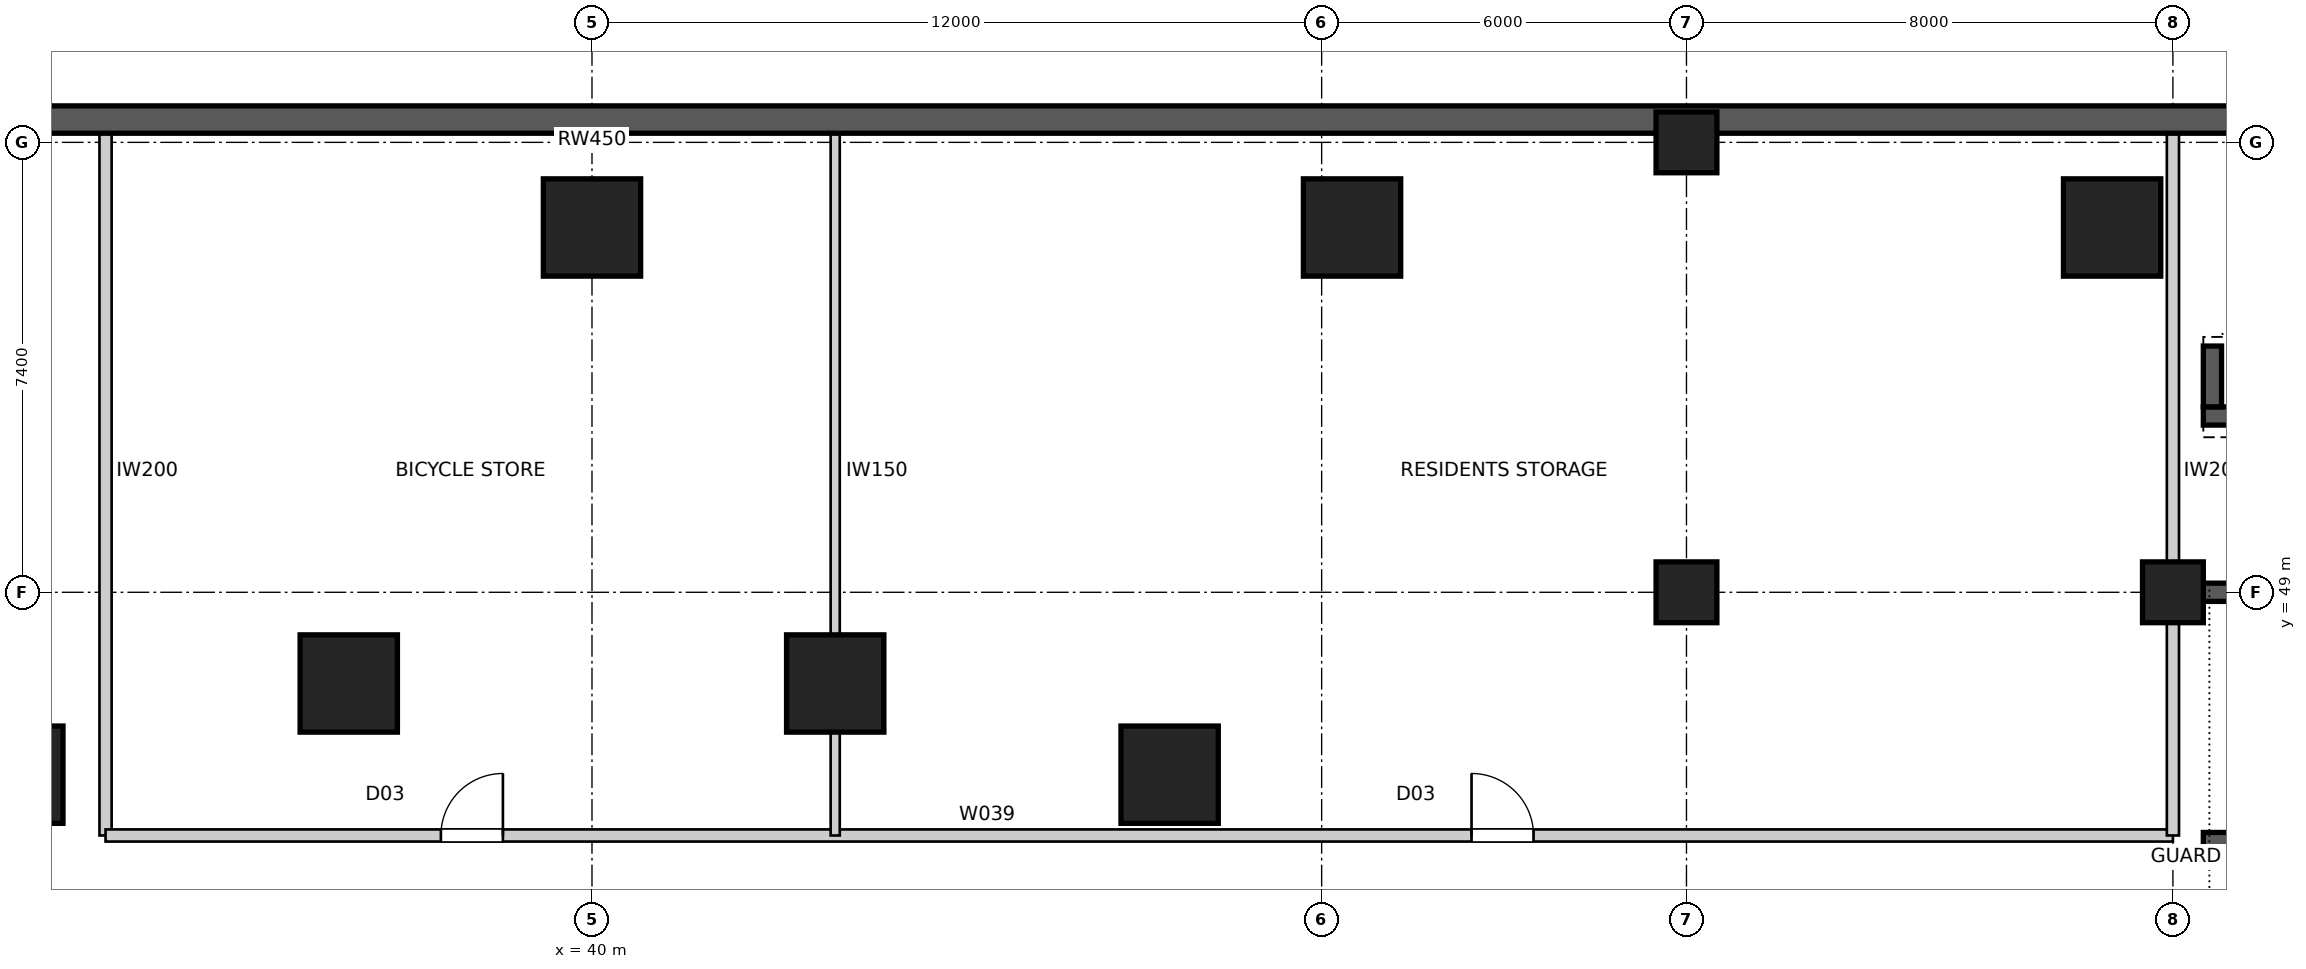
"""IFC4 building model, lengths in metres.
Left out: names, types, materials, properties, quantities, classifications, styles, units other than length and angle.
Written with IfcOpenShell. Run it as: python <this file> out.ifc"""

import sys

from ifc_helpers import new_model, si_unit, direction, frame, frame_2d, origin, origin_2d, place, context, subcontext, project, spatial, rectangle, extrude, element, fill, save


model = new_model("IFC4")
c1 = context("Model", 3, precision=1e-05, world=origin(), true_north=direction((0.0, 1.0)))
c2 = subcontext(c1, "Body", "Model", "MODEL_VIEW")
j1 = project(units=[si_unit("LENGTHUNIT", "METRE"), si_unit("PLANEANGLEUNIT", "RADIAN")], contexts=[c1])
p1 = place(None, origin())
s1 = spatial("IfcSite", under=j1, at=p1, CompositionType="ELEMENT")
p2 = place(p1, origin())
s2 = spatial("IfcBuilding", under=s1, at=p2, CompositionType="ELEMENT")
p3 = place(p2, frame((0.0, 0.0, -3.7)))
s3 = spatial("IfcBuildingStorey", under=s2, at=p3, CompositionType="ELEMENT", Elevation=-3.7)
for number, where, z_axis, x_axis in (
    (1, (65.0, 55.0, 0.0), (0.0, 0.0, 1.0), (1.0, 0.0, 0.0)),
    (2, (52.5, 55.0, 0.0), (0.0, 0.0, 1.0), (1.0, 0.0, 0.0)),
    (3, (40.0, 55.0, 0.0), (0.0, 0.0, 1.0), (1.0, 0.0, 0.0)),
):
    element("IfcColumn", number, at=place(p3, frame(where, z_axis=z_axis, x_axis=x_axis)), inside=s3, PredefinedType="COLUMN", context=c2, shape_type="SweptSolid", body=[
        extrude(rectangle(XDim=1.6, YDim=1.6, at=origin_2d()), origin(), (0.0, 0.0, 1.0), 3.7),
    ])
for number, where, z_axis, x_axis in (
    (4, (58.0, 49.0, 0.0), (0.0, 0.0, 1.0), (1.0, 0.0, 0.0)),
    (5, (58.0, 56.4, 0.0), (0.0, 0.0, 1.0), (1.0, 0.0, 0.0)),
    (6, (66.0, 49.0, 0.0), (0.0, 0.0, 1.0), (1.0, 0.0, 0.0)),
):
    element("IfcColumn", number, at=place(p3, frame(where, z_axis=z_axis, x_axis=x_axis)), inside=s3, PredefinedType="COLUMN", context=c2, shape_type="SweptSolid", body=[
        extrude(rectangle(XDim=1.0, YDim=1.0, at=origin_2d()), origin(), (0.0, 0.0, 1.0), 3.7),
    ])
for number, where, z_axis, x_axis in (
    (7, (49.5, 46.0, 0.0), (0.0, 0.0, 1.0), (1.0, 0.0, 0.0)),
    (8, (44.0, 47.5, 0.0), (0.0, 0.0, 1.0), (1.0, 0.0, 0.0)),
    (9, (36.0, 47.5, 0.0), (0.0, 0.0, 1.0), (1.0, 0.0, 0.0)),
    (10, (30.5, 46.0, 0.0), (0.0, 0.0, 1.0), (1.0, 0.0, 0.0)),
):
    element("IfcColumn", number, at=place(p3, frame(where, z_axis=z_axis, x_axis=x_axis)), inside=s3, PredefinedType="COLUMN", context=c2, shape_type="SweptSolid", body=[
        extrude(rectangle(XDim=1.6, YDim=1.6, at=origin_2d()), origin(), (0.0, 0.0, 1.0), 3.7),
    ])
p4 = place(p3, frame((78.0, 56.775, 0.0), z_axis=(0.0, 0.0, 1.0), x_axis=(-1.0, 0.0, 0.0)))
e11 = element("IfcWall", 11, at=p4, inside=s3, PredefinedType="SHEAR", context=c2, shape_type="SweptSolid", body=[
    extrude(rectangle(XDim=76.0, YDim=0.45, at=frame_2d((38.0, 0.0))), origin(), (0.0, 0.0, 1.0), 3.7),
])
p5 = place(p3, frame((32.0, 57.0, 0.0), z_axis=(0.0, 0.0, 1.0), x_axis=(0.0, -1.0, 0.0)))
e12 = element("IfcWall", 12, at=p5, inside=s3, PredefinedType="PARTITIONING", context=c2, shape_type="SweptSolid", body=[
    extrude(rectangle(XDim=12.0, YDim=0.2, at=frame_2d((6.0, 0.0))), origin(), (0.0, 0.0, 1.0), 3.35),
])
p6 = place(p3, frame((32.0, 45.0, 0.0), z_axis=(0.0, 0.0, 1.0), x_axis=(1.0, 0.0, 0.0)))
e13 = element("IfcWall", 13, at=p6, inside=s3, PredefinedType="PARTITIONING", context=c2, shape_type="SweptSolid", body=[
    extrude(rectangle(XDim=34.0, YDim=0.2, at=frame_2d((17.0, 0.0))), origin(), (0.0, 0.0, 1.0), 3.35),
])
p7 = place(p6, frame((22.465, 0.0, 0.0)))
e14 = element("IfcOpeningElement", 14, at=p7, cuts=e13, PredefinedType="OPENING", context=c2, shape_type="SweptSolid", body=[
    extrude(rectangle(XDim=1.02, YDim=2.1, at=frame_2d((0.51, 1.05))), frame((0.0, 0.11, 0.0), z_axis=(0.0, -1.0, 0.0), x_axis=(1.0, 0.0, 0.0)), (0.0, 0.0, 1.0), 0.22),
])
p8 = place(p6, frame((5.515, 0.0, 0.0)))
e15 = element("IfcOpeningElement", 15, at=p8, cuts=e13, PredefinedType="OPENING", context=c2, shape_type="SweptSolid", body=[
    extrude(rectangle(XDim=1.02, YDim=2.1, at=frame_2d((0.51, 1.05))), frame((0.0, 0.11, 0.0), z_axis=(0.0, -1.0, 0.0), x_axis=(1.0, 0.0, 0.0)), (0.0, 0.0, 1.0), 0.22),
])
p9 = place(p3, frame((44.0, 57.0, 0.0), z_axis=(0.0, 0.0, 1.0), x_axis=(0.0, -1.0, 0.0)))
e16 = element("IfcWall", 16, at=p9, inside=s3, PredefinedType="SOLIDWALL", context=c2, shape_type="SweptSolid", body=[
    extrude(rectangle(XDim=12.0, YDim=0.15, at=frame_2d((6.0, 0.0))), origin(), (0.0, 0.0, 1.0), 3.35),
])
p10 = place(p3, frame((66.0, 57.0, 0.0), z_axis=(0.0, 0.0, 1.0), x_axis=(0.0, -1.0, 0.0)))
e17 = element("IfcWall", 17, at=p10, inside=s3, PredefinedType="PARTITIONING", context=c2, shape_type="SweptSolid", body=[
    extrude(rectangle(XDim=12.0, YDim=0.2, at=frame_2d((6.0, 0.0))), origin(), (0.0, 0.0, 1.0), 3.35),
])
p11 = place(p3, frame((66.5, 44.9, 0.0), z_axis=(0.0, 0.0, 1.0), x_axis=(1.0, 0.0, 0.0)))
e18 = element("IfcWall", 18, at=p11, inside=s3, PredefinedType="SHEAR", context=c2, shape_type="SweptSolid", body=[
    extrude(rectangle(XDim=5.1, YDim=0.3, at=frame_2d((2.55, 0.0))), origin(), (0.0, 0.0, 1.0), 1.59),
])
p12 = place(p3, frame((66.5, 49.0, 0.0), z_axis=(0.0, 0.0, 1.0), x_axis=(1.0, 0.0, 0.0)))
e19 = element("IfcWall", 19, at=p12, inside=s3, PredefinedType="SHEAR", context=c2, shape_type="SweptSolid", body=[
    extrude(rectangle(XDim=5.1, YDim=0.3, at=frame_2d((2.55, 0.0))), origin(), (0.0, 0.0, 1.0), 2.615),
])
p13 = place(p3, frame((66.5, 51.9, -3.7), z_axis=(0.0, 0.0, 1.0), x_axis=(1.0, 0.0, 0.0)))
e20 = element("IfcWall", 20, at=p13, inside=s3, PredefinedType="SHEAR", context=c2, shape_type="SweptSolid", body=[
    extrude(rectangle(XDim=5.1, YDim=0.3, at=frame_2d((2.55, 0.0))), origin(), (0.0, 0.0, 1.0), 6.977),
])
p14 = place(p3, frame((66.65, 52.05, -3.7), z_axis=(0.0, 0.0, 1.0), x_axis=(0.0, 1.0, 0.0)))
e21 = element("IfcWall", 21, at=p14, inside=s3, PredefinedType="SHEAR", context=c2, shape_type="SweptSolid", body=[
    extrude(rectangle(XDim=1.0, YDim=0.3, at=frame_2d((0.5, 0.0))), origin(), (0.0, 0.0, 1.0), 7.014),
])
p15 = place(p7, origin())
e22 = element("IfcDoor", 22, at=p15, inside=s3, OperationType="SINGLE_SWING_LEFT", PredefinedType="DOOR", context=c2, shape_type="SweptSolid", body=[
    extrude(rectangle(XDim=1.02, YDim=2.1, at=frame_2d((0.51, 1.05))), frame((0.0, 0.025, 0.0), z_axis=(0.0, -1.0, 0.0), x_axis=(1.0, 0.0, 0.0)), (0.0, 0.0, 1.0), 0.05),
])
fill(e14, e22)
p16 = place(p8, origin())
e23 = element("IfcDoor", 23, at=p16, inside=s3, OperationType="SINGLE_SWING_RIGHT", PredefinedType="DOOR", context=c2, shape_type="SweptSolid", body=[
    extrude(rectangle(XDim=1.02, YDim=2.1, at=frame_2d((0.51, 1.05))), frame((0.0, 0.025, 0.0), z_axis=(0.0, -1.0, 0.0), x_axis=(1.0, 0.0, 0.0)), (0.0, 0.0, 1.0), 0.05),
])
fill(e15, e23)
save(model, sys.argv[1])
